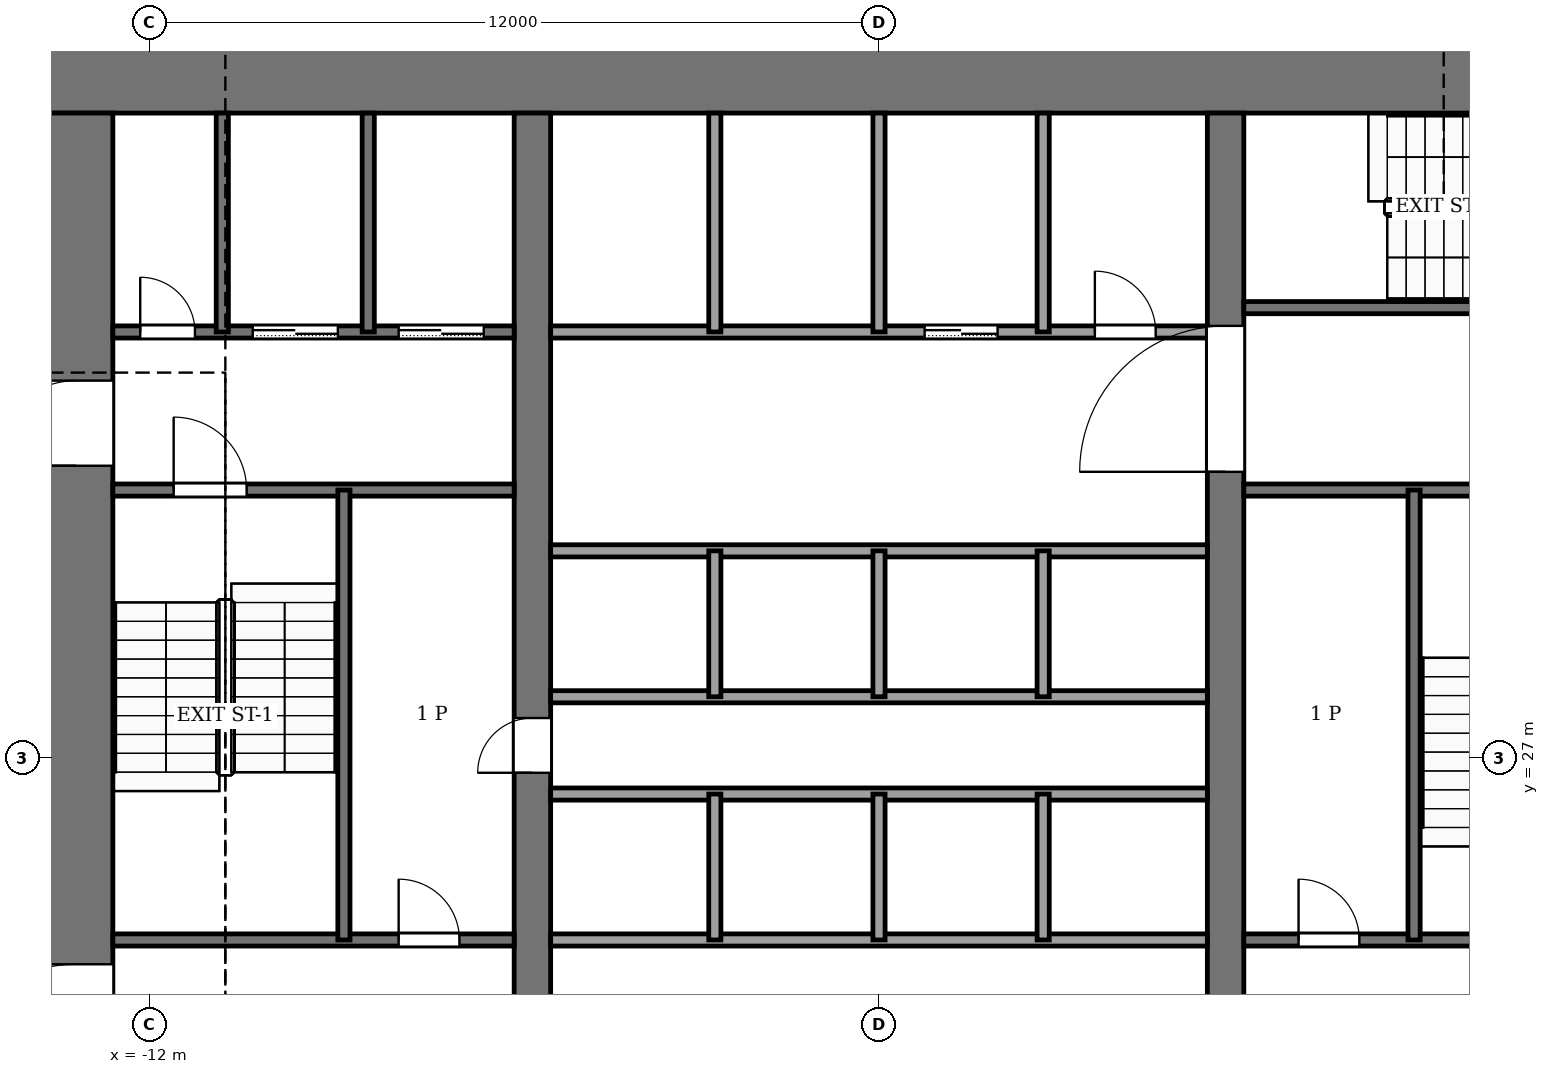
"""IFC4 building model, lengths in metres.
Left out: names, types, materials, properties, quantities, classifications, styles, units other than length and angle.
Written with IfcOpenShell. Run it as: python <this file> out.ifc"""

import sys

from ifc_helpers import new_model, si_unit, direction, frame, frame_2d, origin, place, context, subcontext, project, spatial, rectangle, extrude, element, fill, save


model = new_model("IFC4")
c1 = context("Model", 3, precision=1e-05, world=origin(), true_north=direction((0.0, 1.0)))
c2 = subcontext(c1, "Body", "Model", "MODEL_VIEW")
j1 = project(units=[si_unit("LENGTHUNIT", "METRE"), si_unit("PLANEANGLEUNIT", "RADIAN")], contexts=[c1])
p1 = place(None, origin())
s1 = spatial("IfcSite", under=j1, at=p1, CompositionType="ELEMENT")
p2 = place(p1, origin())
s2 = spatial("IfcBuilding", under=s1, at=p2, CompositionType="ELEMENT")
p3 = place(p2, frame((0.0, 0.0, 114.0)))
s3 = spatial("IfcBuildingStorey", under=s2, at=p3, CompositionType="ELEMENT", Elevation=114.0)
p4 = place(p3, frame((-13.8, 38.2, -0.25), z_axis=(0.0, 0.0, 1.0), x_axis=(1.0, 0.0, 0.0)))
e1 = element("IfcWall", 1, at=p4, inside=s3, PredefinedType="SHEAR", context=c2, shape_type="SweptSolid", body=[
    extrude(rectangle(XDim=27.6, YDim=1.2, at=frame_2d((13.8, 0.0))), origin(), (0.0, 0.0, 1.0), 7.12),
])
p5 = place(p3, frame((-13.2, 18.4, -0.25), z_axis=(0.0, 0.0, 1.0), x_axis=(0.0, 1.0, 0.0)))
e2 = element("IfcWall", 2, at=p5, inside=s3, PredefinedType="SHEAR", context=c2, shape_type="SweptSolid", body=[
    extrude(rectangle(XDim=19.2, YDim=1.2, at=frame_2d((9.6, 0.0))), origin(), (0.0, 0.0, 1.0), 7.12),
])
p6 = place(p5, frame((2.8, 0.0, 0.25)))
e3 = element("IfcOpeningElement", 3, at=p6, cuts=e2, PredefinedType="OPENING", context=c2, shape_type="SweptSolid", body=[
    extrude(rectangle(XDim=2.4, YDim=2.4, at=frame_2d((1.2, 1.2))), frame((0.0, 0.61, 0.0), z_axis=(0.0, -1.0, 0.0), x_axis=(1.0, 0.0, 0.0)), (0.0, 0.0, 1.0), 1.22),
])
p7 = place(p5, frame((13.4, 0.0, 0.25)))
e4 = element("IfcOpeningElement", 4, at=p7, cuts=e2, PredefinedType="OPENING", context=c2, shape_type="SweptSolid", body=[
    extrude(rectangle(XDim=1.4, YDim=2.2, at=frame_2d((0.7, 1.1))), frame((0.0, 0.61, 0.0), z_axis=(0.0, -1.0, 0.0), x_axis=(1.0, 0.0, 0.0)), (0.0, 0.0, 1.0), 1.22),
])
p8 = place(p3, frame((-5.7, 18.4, -0.25), z_axis=(0.0, 0.0, 1.0), x_axis=(0.0, 1.0, 0.0)))
e5 = element("IfcWall", 5, at=p8, inside=s3, PredefinedType="SHEAR", context=c2, shape_type="SweptSolid", body=[
    extrude(rectangle(XDim=19.2, YDim=0.6, at=frame_2d((9.6, 0.0))), origin(), (0.0, 0.0, 1.0), 7.12),
])
p9 = place(p8, frame((8.35, 0.0, 0.25)))
e6 = element("IfcOpeningElement", 6, at=p9, cuts=e5, PredefinedType="OPENING", context=c2, shape_type="SweptSolid", body=[
    extrude(rectangle(XDim=0.9, YDim=2.1, at=frame_2d((0.45, 1.05))), frame((0.0, 0.31, 0.0), z_axis=(0.0, -1.0, 0.0), x_axis=(1.0, 0.0, 0.0)), (0.0, 0.0, 1.0), 0.62),
])
p10 = place(p3, frame((5.7, 18.4, -0.25), z_axis=(0.0, 0.0, 1.0), x_axis=(0.0, 1.0, 0.0)))
e7 = element("IfcWall", 7, at=p10, inside=s3, PredefinedType="SHEAR", context=c2, shape_type="SweptSolid", body=[
    extrude(rectangle(XDim=19.2, YDim=0.6, at=frame_2d((9.6, 0.0))), origin(), (0.0, 0.0, 1.0), 7.12),
])
p11 = place(p10, frame((13.3, 0.0, 0.25)))
e8 = element("IfcOpeningElement", 8, at=p11, cuts=e7, PredefinedType="OPENING", context=c2, shape_type="SweptSolid", body=[
    extrude(rectangle(XDim=2.4, YDim=2.4, at=frame_2d((1.2, 1.2))), frame((0.0, 0.31, 0.0), z_axis=(0.0, -1.0, 0.0), x_axis=(1.0, 0.0, 0.0)), (0.0, 0.0, 1.0), 0.62),
])
p12 = place(p3, frame((-12.6, 24.0, 0.0), z_axis=(0.0, 0.0, 1.0), x_axis=(1.0, 0.0, 0.0)))
e9 = element("IfcWall", 9, at=p12, inside=s3, PredefinedType="PARTITIONING", context=c2, shape_type="SweptSolid", body=[
    extrude(rectangle(XDim=6.6, YDim=0.2, at=frame_2d((3.3, 0.0))), origin(), (0.0, 0.0, 1.0), 6.87),
])
p13 = place(p12, frame((4.7, 0.0, 0.0)))
e10 = element("IfcOpeningElement", 10, at=p13, cuts=e9, PredefinedType="OPENING", context=c2, shape_type="SweptSolid", body=[
    extrude(rectangle(XDim=1.0, YDim=2.1, at=frame_2d((0.5, 1.05))), frame((0.0, 0.11, 0.0), z_axis=(0.0, -1.0, 0.0), x_axis=(1.0, 0.0, 0.0)), (0.0, 0.0, 1.0), 0.22),
])
p14 = place(p3, frame((-5.4, 24.0, 0.0), z_axis=(0.0, 0.0, 1.0), x_axis=(1.0, 0.0, 0.0)))
e11 = element("IfcWall", 11, at=p14, inside=s3, PredefinedType="PARTITIONING", context=c2, shape_type="SweptSolid", body=[
    extrude(rectangle(XDim=10.8, YDim=0.2, at=frame_2d((5.4, 0.0))), origin(), (0.0, 0.0, 1.0), 6.87),
])
p15 = place(p3, frame((6.0, 24.0, 0.0), z_axis=(0.0, 0.0, 1.0), x_axis=(1.0, 0.0, 0.0)))
e12 = element("IfcWall", 12, at=p15, inside=s3, PredefinedType="PARTITIONING", context=c2, shape_type="SweptSolid", body=[
    extrude(rectangle(XDim=6.6, YDim=0.2, at=frame_2d((3.3, 0.0))), origin(), (0.0, 0.0, 1.0), 6.87),
])
p16 = place(p15, frame((0.9, 0.0, 0.0)))
e13 = element("IfcOpeningElement", 13, at=p16, cuts=e12, PredefinedType="OPENING", context=c2, shape_type="SweptSolid", body=[
    extrude(rectangle(XDim=1.0, YDim=2.1, at=frame_2d((0.5, 1.05))), frame((0.0, 0.11, 0.0), z_axis=(0.0, -1.0, 0.0), x_axis=(1.0, 0.0, 0.0)), (0.0, 0.0, 1.0), 0.22),
])
p17 = place(p15, frame((4.4, 0.0, 0.0)))
e14 = element("IfcOpeningElement", 14, at=p17, cuts=e12, PredefinedType="OPENING", context=c2, shape_type="SweptSolid", body=[
    extrude(rectangle(XDim=1.2, YDim=2.2, at=frame_2d((0.6, 1.1))), frame((0.0, 0.11, 0.0), z_axis=(0.0, -1.0, 0.0), x_axis=(1.0, 0.0, 0.0)), (0.0, 0.0, 1.0), 0.22),
])
for number, where, z_axis, x_axis in (
    (15, (-5.4, 26.4, 0.0), (0.0, 0.0, 1.0), (1.0, 0.0, 0.0)),
    (16, (-5.4, 28.0, 0.0), (0.0, 0.0, 1.0), (1.0, 0.0, 0.0)),
    (17, (-5.4, 30.4, 0.0), (0.0, 0.0, 1.0), (1.0, 0.0, 0.0)),
):
    element("IfcWall", number, at=place(p3, frame(where, z_axis=z_axis, x_axis=x_axis)), inside=s3, PredefinedType="PARTITIONING", context=c2, shape_type="SweptSolid", body=[
        extrude(rectangle(XDim=10.8, YDim=0.2, at=frame_2d((5.4, 0.0))), origin(), (0.0, 0.0, 1.0), 6.87),
    ])
p18 = place(p3, frame((-12.6, 31.4, 0.0), z_axis=(0.0, 0.0, 1.0), x_axis=(1.0, 0.0, 0.0)))
e18 = element("IfcWall", 18, at=p18, inside=s3, PredefinedType="PARTITIONING", context=c2, shape_type="SweptSolid", body=[
    extrude(rectangle(XDim=6.6, YDim=0.2, at=frame_2d((3.3, 0.0))), origin(), (0.0, 0.0, 1.0), 6.87),
])
p19 = place(p18, frame((1.0, 0.0, 0.0)))
e19 = element("IfcOpeningElement", 19, at=p19, cuts=e18, PredefinedType="OPENING", context=c2, shape_type="SweptSolid", body=[
    extrude(rectangle(XDim=1.2, YDim=2.2, at=frame_2d((0.6, 1.1))), frame((0.0, 0.11, 0.0), z_axis=(0.0, -1.0, 0.0), x_axis=(1.0, 0.0, 0.0)), (0.0, 0.0, 1.0), 0.22),
])
p20 = place(p3, frame((6.0, 31.4, 0.0), z_axis=(0.0, 0.0, 1.0), x_axis=(1.0, 0.0, 0.0)))
e20 = element("IfcWall", 20, at=p20, inside=s3, PredefinedType="PARTITIONING", context=c2, shape_type="SweptSolid", body=[
    extrude(rectangle(XDim=6.6, YDim=0.2, at=frame_2d((3.3, 0.0))), origin(), (0.0, 0.0, 1.0), 6.87),
])
p21 = place(p3, frame((-12.6, 34.0, 0.0), z_axis=(0.0, 0.0, 1.0), x_axis=(1.0, 0.0, 0.0)))
e21 = element("IfcWall", 21, at=p21, inside=s3, PredefinedType="PARTITIONING", context=c2, shape_type="SweptSolid", body=[
    extrude(rectangle(XDim=6.6, YDim=0.2, at=frame_2d((3.3, 0.0))), origin(), (0.0, 0.0, 1.0), 6.87),
])
p22 = place(p21, frame((4.7, 0.0, 0.0)))
e22 = element("IfcOpeningElement", 22, at=p22, cuts=e21, PredefinedType="OPENING", context=c2, shape_type="SweptSolid", body=[
    extrude(rectangle(XDim=1.4, YDim=2.2, at=frame_2d((0.7, 1.1))), frame((0.0, 0.11, 0.0), z_axis=(0.0, -1.0, 0.0), x_axis=(1.0, 0.0, 0.0)), (0.0, 0.0, 1.0), 0.22),
])
p23 = place(p21, frame((2.3, 0.0, 0.0)))
e23 = element("IfcOpeningElement", 23, at=p23, cuts=e21, PredefinedType="OPENING", context=c2, shape_type="SweptSolid", body=[
    extrude(rectangle(XDim=1.4, YDim=2.2, at=frame_2d((0.7, 1.1))), frame((0.0, 0.11, 0.0), z_axis=(0.0, -1.0, 0.0), x_axis=(1.0, 0.0, 0.0)), (0.0, 0.0, 1.0), 0.22),
])
p24 = place(p21, frame((0.45, 0.0, 0.0)))
e24 = element("IfcOpeningElement", 24, at=p24, cuts=e21, PredefinedType="OPENING", context=c2, shape_type="SweptSolid", body=[
    extrude(rectangle(XDim=0.9, YDim=2.1, at=frame_2d((0.45, 1.05))), frame((0.0, 0.11, 0.0), z_axis=(0.0, -1.0, 0.0), x_axis=(1.0, 0.0, 0.0)), (0.0, 0.0, 1.0), 0.22),
])
p25 = place(p3, frame((-5.4, 34.0, 0.0), z_axis=(0.0, 0.0, 1.0), x_axis=(1.0, 0.0, 0.0)))
e25 = element("IfcWall", 25, at=p25, inside=s3, PredefinedType="PARTITIONING", context=c2, shape_type="SweptSolid", body=[
    extrude(rectangle(XDim=10.8, YDim=0.2, at=frame_2d((5.4, 0.0))), origin(), (0.0, 0.0, 1.0), 6.87),
])
p26 = place(p25, frame((6.15, 0.0, 0.0)))
e26 = element("IfcOpeningElement", 26, at=p26, cuts=e25, PredefinedType="OPENING", context=c2, shape_type="SweptSolid", body=[
    extrude(rectangle(XDim=1.2, YDim=2.2, at=frame_2d((0.6, 1.1))), frame((0.0, 0.11, 0.0), z_axis=(0.0, -1.0, 0.0), x_axis=(1.0, 0.0, 0.0)), (0.0, 0.0, 1.0), 0.22),
])
p27 = place(p25, frame((8.95, 0.0, 0.0)))
e27 = element("IfcOpeningElement", 27, at=p27, cuts=e25, PredefinedType="OPENING", context=c2, shape_type="SweptSolid", body=[
    extrude(rectangle(XDim=1.0, YDim=2.1, at=frame_2d((0.5, 1.05))), frame((0.0, 0.11, 0.0), z_axis=(0.0, -1.0, 0.0), x_axis=(1.0, 0.0, 0.0)), (0.0, 0.0, 1.0), 0.22),
])
p28 = place(p3, frame((6.0, 34.4, 0.0), z_axis=(0.0, 0.0, 1.0), x_axis=(1.0, 0.0, 0.0)))
e28 = element("IfcWall", 28, at=p28, inside=s3, PredefinedType="PARTITIONING", context=c2, shape_type="SweptSolid", body=[
    extrude(rectangle(XDim=6.6, YDim=0.2, at=frame_2d((3.3, 0.0))), origin(), (0.0, 0.0, 1.0), 6.87),
])
p29 = place(p28, frame((4.8, 0.0, 0.0)))
e29 = element("IfcOpeningElement", 29, at=p29, cuts=e28, PredefinedType="OPENING", context=c2, shape_type="SweptSolid", body=[
    extrude(rectangle(XDim=1.2, YDim=2.2, at=frame_2d((0.6, 1.1))), frame((0.0, 0.11, 0.0), z_axis=(0.0, -1.0, 0.0), x_axis=(1.0, 0.0, 0.0)), (0.0, 0.0, 1.0), 0.22),
])
p30 = place(p3, frame((-10.8, 34.0, 0.0), z_axis=(0.0, 0.0, 1.0), x_axis=(0.0, 1.0, 0.0)))
e30 = element("IfcWall", 30, at=p30, inside=s3, PredefinedType="PARTITIONING", context=c2, shape_type="SweptSolid", body=[
    extrude(rectangle(XDim=3.6, YDim=0.2, at=frame_2d((1.8, 0.0))), origin(), (0.0, 0.0, 1.0), 6.87),
])
p31 = place(p3, frame((-8.8, 24.0, 0.0), z_axis=(0.0, 0.0, 1.0), x_axis=(0.0, 1.0, 0.0)))
e31 = element("IfcWall", 31, at=p31, inside=s3, PredefinedType="PARTITIONING", context=c2, shape_type="SweptSolid", body=[
    extrude(rectangle(XDim=7.4, YDim=0.2, at=frame_2d((3.7, 0.0))), origin(), (0.0, 0.0, 1.0), 6.87),
])
p32 = place(p3, frame((-8.4, 34.0, 0.0), z_axis=(0.0, 0.0, 1.0), x_axis=(0.0, 1.0, 0.0)))
e32 = element("IfcWall", 32, at=p32, inside=s3, PredefinedType="PARTITIONING", context=c2, shape_type="SweptSolid", body=[
    extrude(rectangle(XDim=3.6, YDim=0.2, at=frame_2d((1.8, 0.0))), origin(), (0.0, 0.0, 1.0), 6.87),
])
for number, where, z_axis, x_axis in (
    (33, (-2.7, 24.0, 0.0), (0.0, 0.0, 1.0), (0.0, 1.0, 0.0)),
    (34, (-2.7, 28.0, 0.0), (0.0, 0.0, 1.0), (0.0, 1.0, 0.0)),
):
    element("IfcWall", number, at=place(p3, frame(where, z_axis=z_axis, x_axis=x_axis)), inside=s3, PredefinedType="PARTITIONING", context=c2, shape_type="SweptSolid", body=[
        extrude(rectangle(XDim=2.4, YDim=0.2, at=frame_2d((1.2, 0.0))), origin(), (0.0, 0.0, 1.0), 6.87),
    ])
p33 = place(p3, frame((-2.7, 34.0, 0.0), z_axis=(0.0, 0.0, 1.0), x_axis=(0.0, 1.0, 0.0)))
e35 = element("IfcWall", 35, at=p33, inside=s3, PredefinedType="PARTITIONING", context=c2, shape_type="SweptSolid", body=[
    extrude(rectangle(XDim=3.6, YDim=0.2, at=frame_2d((1.8, 0.0))), origin(), (0.0, 0.0, 1.0), 6.87),
])
for number, where, z_axis, x_axis in (
    (36, (0.0, 24.0, 0.0), (0.0, 0.0, 1.0), (0.0, 1.0, 0.0)),
    (37, (0.0, 28.0, 0.0), (0.0, 0.0, 1.0), (0.0, 1.0, 0.0)),
):
    element("IfcWall", number, at=place(p3, frame(where, z_axis=z_axis, x_axis=x_axis)), inside=s3, PredefinedType="PARTITIONING", context=c2, shape_type="SweptSolid", body=[
        extrude(rectangle(XDim=2.4, YDim=0.2, at=frame_2d((1.2, 0.0))), origin(), (0.0, 0.0, 1.0), 6.87),
    ])
p34 = place(p3, frame((0.0, 34.0, 0.0), z_axis=(0.0, 0.0, 1.0), x_axis=(0.0, 1.0, 0.0)))
e38 = element("IfcWall", 38, at=p34, inside=s3, PredefinedType="PARTITIONING", context=c2, shape_type="SweptSolid", body=[
    extrude(rectangle(XDim=3.6, YDim=0.2, at=frame_2d((1.8, 0.0))), origin(), (0.0, 0.0, 1.0), 6.87),
])
for number, where, z_axis, x_axis in (
    (39, (2.7, 24.0, 0.0), (0.0, 0.0, 1.0), (0.0, 1.0, 0.0)),
    (40, (2.7, 28.0, 0.0), (0.0, 0.0, 1.0), (0.0, 1.0, 0.0)),
):
    element("IfcWall", number, at=place(p3, frame(where, z_axis=z_axis, x_axis=x_axis)), inside=s3, PredefinedType="PARTITIONING", context=c2, shape_type="SweptSolid", body=[
        extrude(rectangle(XDim=2.4, YDim=0.2, at=frame_2d((1.2, 0.0))), origin(), (0.0, 0.0, 1.0), 6.87),
    ])
p35 = place(p3, frame((2.7, 34.0, 0.0), z_axis=(0.0, 0.0, 1.0), x_axis=(0.0, 1.0, 0.0)))
e41 = element("IfcWall", 41, at=p35, inside=s3, PredefinedType="PARTITIONING", context=c2, shape_type="SweptSolid", body=[
    extrude(rectangle(XDim=3.6, YDim=0.2, at=frame_2d((1.8, 0.0))), origin(), (0.0, 0.0, 1.0), 6.87),
])
p36 = place(p3, frame((8.8, 24.0, 0.0), z_axis=(0.0, 0.0, 1.0), x_axis=(0.0, 1.0, 0.0)))
e42 = element("IfcWall", 42, at=p36, inside=s3, PredefinedType="PARTITIONING", context=c2, shape_type="SweptSolid", body=[
    extrude(rectangle(XDim=7.4, YDim=0.2, at=frame_2d((3.7, 0.0))), origin(), (0.0, 0.0, 1.0), 6.87),
])
p37 = place(p26, origin())
e43 = element("IfcDoor", 43, at=p37, inside=s3, OperationType="SLIDING_TO_LEFT", PredefinedType="DOOR", context=c2, shape_type="SweptSolid", body=[
    extrude(rectangle(XDim=1.2, YDim=2.2, at=frame_2d((0.6, 1.1))), frame((0.0, 0.025, 0.0), z_axis=(0.0, -1.0, 0.0), x_axis=(1.0, 0.0, 0.0)), (0.0, 0.0, 1.0), 0.05),
])
fill(e26, e43)
p38 = place(p22, origin())
e44 = element("IfcDoor", 44, at=p38, inside=s3, OperationType="SLIDING_TO_LEFT", PredefinedType="DOOR", context=c2, shape_type="SweptSolid", body=[
    extrude(rectangle(XDim=1.4, YDim=2.2, at=frame_2d((0.7, 1.1))), frame((0.0, 0.025, 0.0), z_axis=(0.0, -1.0, 0.0), x_axis=(1.0, 0.0, 0.0)), (0.0, 0.0, 1.0), 0.05),
])
fill(e22, e44)
p39 = place(p23, origin())
e45 = element("IfcDoor", 45, at=p39, inside=s3, OperationType="SLIDING_TO_LEFT", PredefinedType="DOOR", context=c2, shape_type="SweptSolid", body=[
    extrude(rectangle(XDim=1.4, YDim=2.2, at=frame_2d((0.7, 1.1))), frame((0.0, 0.025, 0.0), z_axis=(0.0, -1.0, 0.0), x_axis=(1.0, 0.0, 0.0)), (0.0, 0.0, 1.0), 0.05),
])
fill(e23, e45)
p40 = place(p24, origin())
e46 = element("IfcDoor", 46, at=p40, inside=s3, OperationType="SINGLE_SWING_RIGHT", PredefinedType="DOOR", context=c2, shape_type="SweptSolid", body=[
    extrude(rectangle(XDim=0.9, YDim=2.1, at=frame_2d((0.45, 1.05))), frame((0.0, 0.025, 0.0), z_axis=(0.0, -1.0, 0.0), x_axis=(1.0, 0.0, 0.0)), (0.0, 0.0, 1.0), 0.05),
])
fill(e24, e46)
p41 = place(p13, origin())
e47 = element("IfcDoor", 47, at=p41, inside=s3, OperationType="SINGLE_SWING_RIGHT", PredefinedType="DOOR", context=c2, shape_type="SweptSolid", body=[
    extrude(rectangle(XDim=1.0, YDim=2.1, at=frame_2d((0.5, 1.05))), frame((0.0, 0.025, 0.0), z_axis=(0.0, -1.0, 0.0), x_axis=(1.0, 0.0, 0.0)), (0.0, 0.0, 1.0), 0.05),
])
fill(e10, e47)
p42 = place(p16, origin())
e48 = element("IfcDoor", 48, at=p42, inside=s3, OperationType="SINGLE_SWING_LEFT", PredefinedType="DOOR", context=c2, shape_type="SweptSolid", body=[
    extrude(rectangle(XDim=1.0, YDim=2.1, at=frame_2d((0.5, 1.05))), frame((0.0, 0.025, 0.0), z_axis=(0.0, -1.0, 0.0), x_axis=(1.0, 0.0, 0.0)), (0.0, 0.0, 1.0), 0.05),
])
fill(e13, e48)
p43 = place(p27, origin())
e49 = element("IfcDoor", 49, at=p43, inside=s3, OperationType="SINGLE_SWING_LEFT", PredefinedType="DOOR", context=c2, shape_type="SweptSolid", body=[
    extrude(rectangle(XDim=1.0, YDim=2.1, at=frame_2d((0.5, 1.05))), frame((0.0, 0.025, 0.0), z_axis=(0.0, -1.0, 0.0), x_axis=(1.0, 0.0, 0.0)), (0.0, 0.0, 1.0), 0.05),
])
fill(e27, e49)
p44 = place(p9, origin())
e50 = element("IfcDoor", 50, at=p44, inside=s3, OperationType="SINGLE_SWING_RIGHT", PredefinedType="DOOR", context=c2, shape_type="SweptSolid", body=[
    extrude(rectangle(XDim=0.9, YDim=2.1, at=frame_2d((0.45, 1.05))), frame((0.0, 0.025, 0.0), z_axis=(0.0, -1.0, 0.0), x_axis=(1.0, 0.0, 0.0)), (0.0, 0.0, 1.0), 0.05),
])
fill(e6, e50)
p45 = place(p19, origin())
e51 = element("IfcDoor", 51, at=p45, inside=s3, OperationType="SINGLE_SWING_RIGHT", PredefinedType="DOOR", context=c2, shape_type="SweptSolid", body=[
    extrude(rectangle(XDim=1.2, YDim=2.2, at=frame_2d((0.6, 1.1))), frame((0.0, 0.025, 0.0), z_axis=(0.0, -1.0, 0.0), x_axis=(1.0, 0.0, 0.0)), (0.0, 0.0, 1.0), 0.05),
])
fill(e19, e51)
p46 = place(p11, origin())
e52 = element("IfcDoor", 52, at=p46, inside=s3, OperationType="DOUBLE_DOOR_SINGLE_SWING", PredefinedType="DOOR", context=c2, shape_type="SweptSolid", body=[
    extrude(rectangle(XDim=2.4, YDim=2.4, at=frame_2d((1.2, 1.2))), frame((0.0, 0.025, 0.0), z_axis=(0.0, -1.0, 0.0), x_axis=(1.0, 0.0, 0.0)), (0.0, 0.0, 1.0), 0.05),
])
fill(e8, e52)
p47 = place(p6, origin())
e53 = element("IfcDoor", 53, at=p47, inside=s3, OperationType="DOUBLE_DOOR_SINGLE_SWING", PredefinedType="DOOR", context=c2, shape_type="SweptSolid", body=[
    extrude(rectangle(XDim=2.4, YDim=2.4, at=frame_2d((1.2, 1.2))), frame((0.0, 0.025, 0.0), z_axis=(0.0, -1.0, 0.0), x_axis=(1.0, 0.0, 0.0)), (0.0, 0.0, 1.0), 0.05),
])
fill(e3, e53)
p48 = place(p7, origin())
e54 = element("IfcDoor", 54, at=p48, inside=s3, OperationType="SINGLE_SWING_RIGHT", PredefinedType="DOOR", context=c2, shape_type="SweptSolid", body=[
    extrude(rectangle(XDim=1.4, YDim=2.2, at=frame_2d((0.7, 1.1))), frame((0.0, 0.025, 0.0), z_axis=(0.0, -1.0, 0.0), x_axis=(1.0, 0.0, 0.0)), (0.0, 0.0, 1.0), 0.05),
])
fill(e4, e54)
save(model, sys.argv[1])
